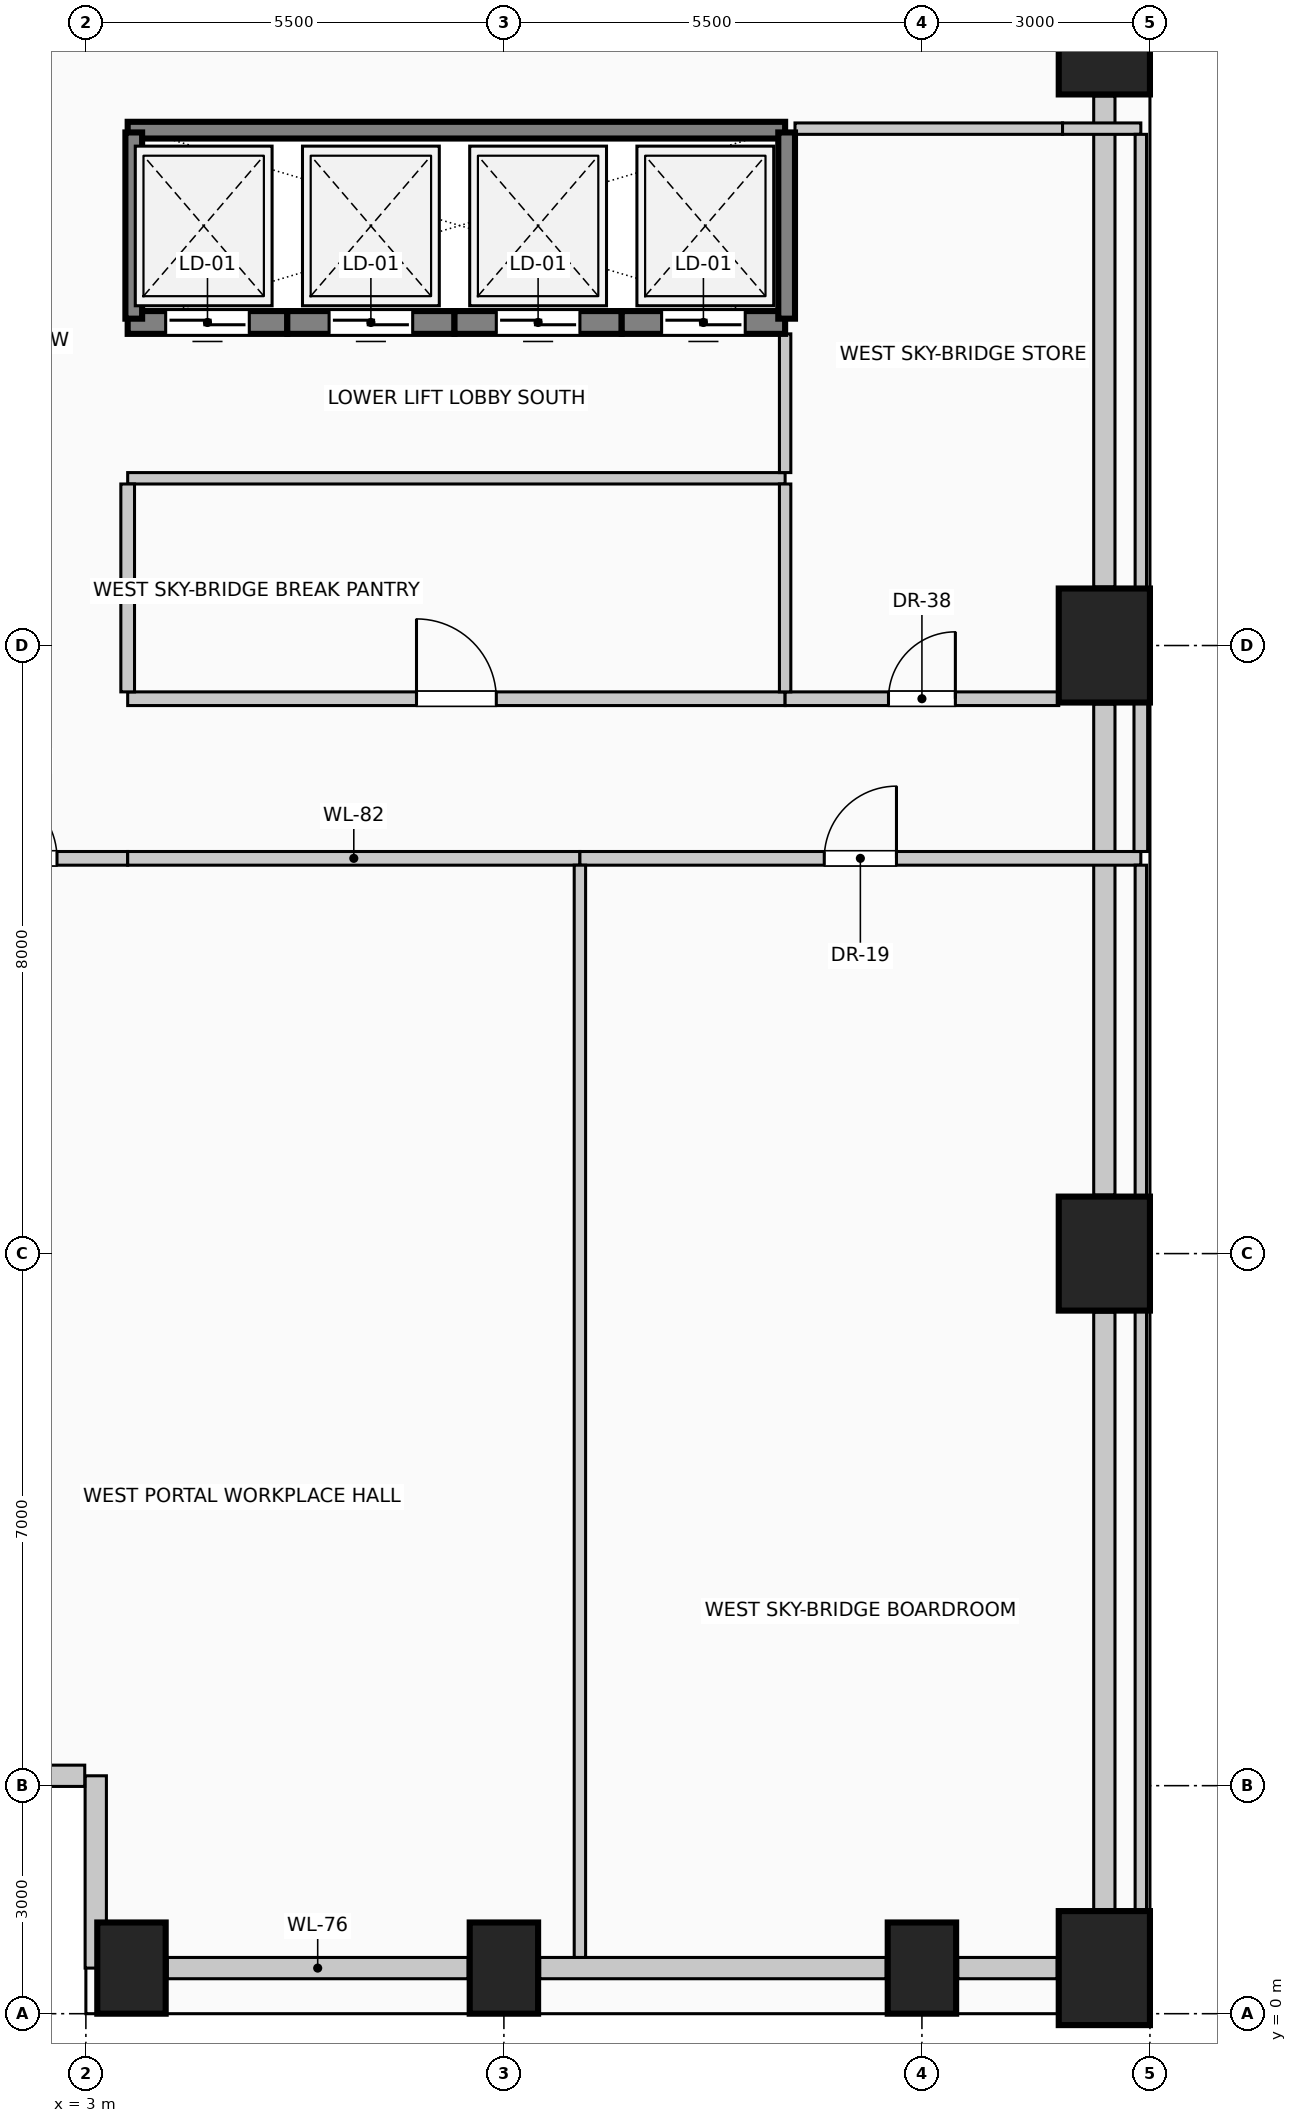
"""IFC4 building model, lengths in metres.
Left out: names, types, materials, properties, quantities, classifications, styles, units other than length and angle.
Written with IfcOpenShell. Run it as: python <this file> out.ifc"""

import sys

from ifc_helpers import new_model, si_unit, direction, frame, frame_2d, origin, origin_2d, place, context, subcontext, project, spatial, rectangle, extrude, element, fill, save


model = new_model("IFC4")
c1 = context("Model", 3, precision=1e-05, world=origin(), true_north=direction((0.0, 1.0)))
c2 = subcontext(c1, "Body", "Model", "MODEL_VIEW")
j1 = project(units=[si_unit("LENGTHUNIT", "METRE"), si_unit("PLANEANGLEUNIT", "RADIAN")], contexts=[c1])
p1 = place(None, origin())
s1 = spatial("IfcSite", under=j1, at=p1, CompositionType="ELEMENT")
p2 = place(p1, origin())
s2 = spatial("IfcBuilding", under=s1, at=p2, CompositionType="ELEMENT")
p3 = place(p2, frame((0.0, 0.0, 42.6)))
s3 = spatial("IfcBuildingStorey", under=s2, at=p3, CompositionType="ELEMENT", Elevation=42.6)
for number, where, z_axis, x_axis in (
    (1, (3.6, 0.6, 0.0), (0.0, 0.0, 1.0), (1.0, 0.0, 0.0)),
    (2, (8.5, 0.6, 0.0), (0.0, 0.0, 1.0), (1.0, 0.0, 0.0)),
    (3, (14.0, 0.6, 0.0), (0.0, 0.0, 1.0), (1.0, 0.0, 0.0)),
):
    element("IfcColumn", number, at=place(p3, frame(where, z_axis=z_axis, x_axis=x_axis)), inside=s3, PredefinedType="COLUMN", context=c2, shape_type="SweptSolid", body=[
        extrude(rectangle(XDim=0.9, YDim=1.2, at=origin_2d()), origin(), (0.0, 0.0, 1.0), 4.0),
    ])
for number, where, z_axis, x_axis in (
    (4, (16.4, 0.6, 0.0), (0.0, 0.0, 1.0), (1.0, 0.0, 0.0)),
    (5, (16.4, 10.0, 0.0), (0.0, 0.0, 1.0), (1.0, 0.0, 0.0)),
    (6, (16.4, 18.0, 0.0), (0.0, 0.0, 1.0), (1.0, 0.0, 0.0)),
    (7, (16.4, 26.0, 0.0), (0.0, 0.0, 1.0), (1.0, 0.0, 0.0)),
):
    element("IfcColumn", number, at=place(p3, frame(where, z_axis=z_axis, x_axis=x_axis)), inside=s3, PredefinedType="COLUMN", context=c2, shape_type="SweptSolid", body=[
        extrude(rectangle(XDim=1.2, YDim=1.5, at=origin_2d()), origin(), (0.0, 0.0, 1.0), 4.0),
    ])
p4 = place(p3, frame((8.03, 0.6, 0.0), z_axis=(0.0, 0.0, 1.0), x_axis=(-1.0, 0.0, 0.0)))
e8 = element("IfcWall", 8, at=p4, inside=s3, PredefinedType="SOLIDWALL", context=c2, shape_type="SweptSolid", body=[
    extrude(rectangle(XDim=3.96, YDim=0.28, at=frame_2d((1.98, 0.0))), origin(), (0.0, 0.0, 1.0), 2.85),
])
p5 = place(p3, frame((13.53, 0.6, 0.0), z_axis=(0.0, 0.0, 1.0), x_axis=(-1.0, 0.0, 0.0)))
e9 = element("IfcWall", 9, at=p5, inside=s3, PredefinedType="SOLIDWALL", context=c2, shape_type="SweptSolid", body=[
    extrude(rectangle(XDim=4.56, YDim=0.28, at=frame_2d((2.28, 0.0))), origin(), (0.0, 0.0, 1.0), 2.85),
])
p6 = place(p3, frame((15.78, 0.6, 0.0), z_axis=(0.0, 0.0, 1.0), x_axis=(-1.0, 0.0, 0.0)))
e10 = element("IfcWall", 10, at=p6, inside=s3, PredefinedType="SOLIDWALL", context=c2, shape_type="SweptSolid", body=[
    extrude(rectangle(XDim=1.31, YDim=0.28, at=frame_2d((0.655, 0.0))), origin(), (0.0, 0.0, 1.0), 2.85),
])
p7 = place(p3, frame((3.13, 0.6, 0.0), z_axis=(0.0, 0.0, 1.0), x_axis=(0.0, 1.0, 0.0)))
e11 = element("IfcWall", 11, at=p7, inside=s3, PredefinedType="SOLIDWALL", context=c2, shape_type="SweptSolid", body=[
    extrude(rectangle(XDim=2.53, YDim=0.28, at=frame_2d((1.265, 0.0))), origin(), (0.0, 0.0, 1.0), 3.7),
])
p8 = place(p3, frame((2.985, 3.13, 0.0), z_axis=(0.0, 0.0, 1.0), x_axis=(-1.0, 0.0, 0.0)))
e12 = element("IfcWall", 12, at=p8, inside=s3, PredefinedType="SOLIDWALL", context=c2, shape_type="SweptSolid", body=[
    extrude(rectangle(XDim=2.385, YDim=0.28, at=frame_2d((1.192, 0.0))), origin(), (0.0, 0.0, 1.0), 3.7),
])
p9 = place(p3, frame((16.4, 9.23, 0.0), z_axis=(0.0, 0.0, 1.0), x_axis=(0.0, -1.0, 0.0)))
e13 = element("IfcWall", 13, at=p9, inside=s3, PredefinedType="SOLIDWALL", context=c2, shape_type="SweptSolid", body=[
    extrude(rectangle(XDim=7.86, YDim=0.28, at=frame_2d((3.93, 0.0))), origin(), (0.0, 0.0, 1.0), 3.0),
])
for number, where, z_axis, x_axis in (
    (14, (16.4, 17.23, 0.0), (0.0, 0.0, 1.0), (0.0, -1.0, 0.0)),
    (15, (16.4, 25.23, 0.0), (0.0, 0.0, 1.0), (0.0, -1.0, 0.0)),
):
    element("IfcWall", number, at=place(p3, frame(where, z_axis=z_axis, x_axis=x_axis)), inside=s3, PredefinedType="SOLIDWALL", context=c2, shape_type="SweptSolid", body=[
        extrude(rectangle(XDim=6.46, YDim=0.28, at=frame_2d((3.23, 0.0))), origin(), (0.0, 0.0, 1.0), 3.0),
    ])
p10 = place(p3, frame((5.65, 22.25, 0.0), z_axis=(0.0, 0.0, 1.0), x_axis=(-1.0, 0.0, 0.0)))
e16 = element("IfcWall", 16, at=p10, inside=s3, PredefinedType="SOLIDWALL", context=c2, shape_type="SweptSolid", body=[
    extrude(rectangle(XDim=2.1, YDim=0.3, at=frame_2d((1.05, 0.0))), origin(), (0.0, 0.0, 1.0), 4.0),
])
p11 = place(p10, frame((0.5, 0.0, 0.0)))
e17 = element("IfcOpeningElement", 17, at=p11, cuts=e16, PredefinedType="OPENING", context=c2, shape_type="SweptSolid", body=[
    extrude(rectangle(XDim=1.1, YDim=2.2, at=frame_2d((0.55, 1.1))), frame((0.0, 0.16, 0.0), z_axis=(0.0, -1.0, 0.0), x_axis=(1.0, 0.0, 0.0)), (0.0, 0.0, 1.0), 0.32),
])
p12 = place(p3, frame((7.85, 22.25, 0.0), z_axis=(0.0, 0.0, 1.0), x_axis=(-1.0, 0.0, 0.0)))
e18 = element("IfcWall", 18, at=p12, inside=s3, PredefinedType="SOLIDWALL", context=c2, shape_type="SweptSolid", body=[
    extrude(rectangle(XDim=2.2, YDim=0.3, at=frame_2d((1.1, 0.0))), origin(), (0.0, 0.0, 1.0), 4.0),
])
p13 = place(p12, frame((0.55, 0.0, 0.0)))
e19 = element("IfcOpeningElement", 19, at=p13, cuts=e18, PredefinedType="OPENING", context=c2, shape_type="SweptSolid", body=[
    extrude(rectangle(XDim=1.1, YDim=2.2, at=frame_2d((0.55, 1.1))), frame((0.0, 0.16, 0.0), z_axis=(0.0, -1.0, 0.0), x_axis=(1.0, 0.0, 0.0)), (0.0, 0.0, 1.0), 0.32),
])
p14 = place(p3, frame((10.05, 22.25, 0.0), z_axis=(0.0, 0.0, 1.0), x_axis=(-1.0, 0.0, 0.0)))
e20 = element("IfcWall", 20, at=p14, inside=s3, PredefinedType="SOLIDWALL", context=c2, shape_type="SweptSolid", body=[
    extrude(rectangle(XDim=2.2, YDim=0.3, at=frame_2d((1.1, 0.0))), origin(), (0.0, 0.0, 1.0), 4.0),
])
p15 = place(p14, frame((0.55, 0.0, 0.0)))
e21 = element("IfcOpeningElement", 21, at=p15, cuts=e20, PredefinedType="OPENING", context=c2, shape_type="SweptSolid", body=[
    extrude(rectangle(XDim=1.1, YDim=2.2, at=frame_2d((0.55, 1.1))), frame((0.0, 0.16, 0.0), z_axis=(0.0, -1.0, 0.0), x_axis=(1.0, 0.0, 0.0)), (0.0, 0.0, 1.0), 0.32),
])
p16 = place(p3, frame((12.2, 22.25, 0.0), z_axis=(0.0, 0.0, 1.0), x_axis=(-1.0, 0.0, 0.0)))
e22 = element("IfcWall", 22, at=p16, inside=s3, PredefinedType="SOLIDWALL", context=c2, shape_type="SweptSolid", body=[
    extrude(rectangle(XDim=2.15, YDim=0.3, at=frame_2d((1.075, 0.0))), origin(), (0.0, 0.0, 1.0), 4.0),
])
p17 = place(p16, frame((0.525, 0.0, 0.0)))
e23 = element("IfcOpeningElement", 23, at=p17, cuts=e22, PredefinedType="OPENING", context=c2, shape_type="SweptSolid", body=[
    extrude(rectangle(XDim=1.1, YDim=2.2, at=frame_2d((0.55, 1.1))), frame((0.0, 0.16, 0.0), z_axis=(0.0, -1.0, 0.0), x_axis=(1.0, 0.0, 0.0)), (0.0, 0.0, 1.0), 0.32),
])
p18 = place(p3, frame((3.55, 24.78, 0.0), z_axis=(0.0, 0.0, 1.0), x_axis=(1.0, 0.0, 0.0)))
e24 = element("IfcWall", 24, at=p18, inside=s3, PredefinedType="SOLIDWALL", context=c2, shape_type="SweptSolid", body=[
    extrude(rectangle(XDim=8.65, YDim=0.22, at=frame_2d((4.325, 0.0))), origin(), (0.0, 0.0, 1.0), 4.0),
])
for number, where, z_axis, x_axis in (
    (25, (3.63, 22.3, 0.0), (0.0, 0.0, 1.0), (0.0, 1.0, 0.0)),
    (26, (12.22, 22.3, 0.0), (0.0, 0.0, 1.0), (0.0, 1.0, 0.0)),
):
    element("IfcWall", number, at=place(p3, frame(where, z_axis=z_axis, x_axis=x_axis)), inside=s3, PredefinedType="SOLIDWALL", context=c2, shape_type="SweptSolid", body=[
        extrude(rectangle(XDim=2.45, YDim=0.22, at=frame_2d((1.225, 0.0))), origin(), (0.0, 0.0, 1.0), 4.0),
    ])
p19 = place(p3, frame((0.74, 15.2, 0.0), z_axis=(0.0, 0.0, 1.0), x_axis=(1.0, 0.0, 0.0)))
e27 = element("IfcWall", 27, at=p19, inside=s3, PredefinedType="PARTITIONING", context=c2, shape_type="SweptSolid", body=[
    extrude(rectangle(XDim=2.81, YDim=0.18, at=frame_2d((1.405, 0.0))), origin(), (0.0, 0.0, 1.0), 3.7),
])
p20 = place(p19, frame((0.93, 0.0, 0.0)))
e28 = element("IfcOpeningElement", 28, at=p20, cuts=e27, PredefinedType="OPENING", context=c2, shape_type="SweptSolid", body=[
    extrude(rectangle(XDim=0.95, YDim=2.15, at=frame_2d((0.475, 1.075))), frame((0.0, 0.1, 0.0), z_axis=(0.0, -1.0, 0.0), x_axis=(1.0, 0.0, 0.0)), (0.0, 0.0, 1.0), 0.2),
])
p21 = place(p3, frame((3.55, 15.2, 0.0), z_axis=(0.0, 0.0, 1.0), x_axis=(1.0, 0.0, 0.0)))
e29 = element("IfcWall", 29, at=p21, inside=s3, PredefinedType="PARTITIONING", context=c2, shape_type="SweptSolid", body=[
    extrude(rectangle(XDim=5.95, YDim=0.18, at=frame_2d((2.975, 0.0))), origin(), (0.0, 0.0, 1.0), 3.7),
])
p22 = place(p3, frame((9.5, 15.2, 0.0), z_axis=(0.0, 0.0, 1.0), x_axis=(1.0, 0.0, 0.0)))
e30 = element("IfcWall", 30, at=p22, inside=s3, PredefinedType="PARTITIONING", context=c2, shape_type="SweptSolid", body=[
    extrude(rectangle(XDim=7.38, YDim=0.18, at=frame_2d((3.69, 0.0))), origin(), (0.0, 0.0, 1.0), 3.7),
])
p23 = place(p22, frame((3.215, 0.0, 0.0)))
e31 = element("IfcOpeningElement", 31, at=p23, cuts=e30, PredefinedType="OPENING", context=c2, shape_type="SweptSolid", body=[
    extrude(rectangle(XDim=0.95, YDim=2.15, at=frame_2d((0.475, 1.075))), frame((0.0, 0.1, 0.0), z_axis=(0.0, -1.0, 0.0), x_axis=(1.0, 0.0, 0.0)), (0.0, 0.0, 1.0), 0.2),
])
p24 = place(p3, frame((3.55, 17.3, 0.0), z_axis=(0.0, 0.0, 1.0), x_axis=(1.0, 0.0, 0.0)))
e32 = element("IfcWall", 32, at=p24, inside=s3, PredefinedType="PARTITIONING", context=c2, shape_type="SweptSolid", body=[
    extrude(rectangle(XDim=8.65, YDim=0.18, at=frame_2d((4.325, 0.0))), origin(), (0.0, 0.0, 1.0), 3.7),
])
p25 = place(p24, frame((3.8, 0.0, 0.0)))
e33 = element("IfcOpeningElement", 33, at=p25, cuts=e32, PredefinedType="OPENING", context=c2, shape_type="SweptSolid", body=[
    extrude(rectangle(XDim=1.05, YDim=2.15, at=frame_2d((0.525, 1.075))), frame((0.0, 0.1, 0.0), z_axis=(0.0, -1.0, 0.0), x_axis=(1.0, 0.0, 0.0)), (0.0, 0.0, 1.0), 0.2),
])
p26 = place(p3, frame((12.2, 17.3, 0.0), z_axis=(0.0, 0.0, 1.0), x_axis=(1.0, 0.0, 0.0)))
e34 = element("IfcWall", 34, at=p26, inside=s3, PredefinedType="PARTITIONING", context=c2, shape_type="SweptSolid", body=[
    extrude(rectangle(XDim=3.6, YDim=0.18, at=frame_2d((1.8, 0.0))), origin(), (0.0, 0.0, 1.0), 3.7),
])
p27 = place(p26, frame((1.36, 0.0, 0.0)))
e35 = element("IfcOpeningElement", 35, at=p27, cuts=e34, PredefinedType="OPENING", context=c2, shape_type="SweptSolid", body=[
    extrude(rectangle(XDim=0.88, YDim=2.1, at=frame_2d((0.44, 1.05))), frame((0.0, 0.1, 0.0), z_axis=(0.0, -1.0, 0.0), x_axis=(1.0, 0.0, 0.0)), (0.0, 0.0, 1.0), 0.2),
])
p28 = place(p3, frame((3.55, 20.2, 0.0), z_axis=(0.0, 0.0, 1.0), x_axis=(1.0, 0.0, 0.0)))
e36 = element("IfcWall", 36, at=p28, inside=s3, PredefinedType="PARTITIONING", context=c2, shape_type="SweptSolid", body=[
    extrude(rectangle(XDim=8.65, YDim=0.15, at=frame_2d((4.325, 0.0))), origin(), (0.0, 0.0, 1.0), 3.7),
])
p29 = place(p3, frame((12.33, 24.8, 0.0), z_axis=(0.0, 0.0, 1.0), x_axis=(1.0, 0.0, 0.0)))
e37 = element("IfcWall", 37, at=p29, inside=s3, PredefinedType="PARTITIONING", context=c2, shape_type="SweptSolid", body=[
    extrude(rectangle(XDim=3.52, YDim=0.15, at=frame_2d((1.76, 0.0))), origin(), (0.0, 0.0, 1.0), 3.7),
])
p30 = place(p3, frame((15.85, 24.8, 0.0), z_axis=(0.0, 0.0, 1.0), x_axis=(1.0, 0.0, 0.0)))
e38 = element("IfcWall", 38, at=p30, inside=s3, PredefinedType="PARTITIONING", context=c2, shape_type="SweptSolid", body=[
    extrude(rectangle(XDim=1.03, YDim=0.15, at=frame_2d((0.515, 0.0))), origin(), (0.0, 0.0, 1.0), 3.7),
])
p31 = place(p3, frame((3.55, 17.39, 0.0), z_axis=(0.0, 0.0, 1.0), x_axis=(0.0, 1.0, 0.0)))
e39 = element("IfcWall", 39, at=p31, inside=s3, PredefinedType="PARTITIONING", context=c2, shape_type="SweptSolid", body=[
    extrude(rectangle(XDim=2.735, YDim=0.18, at=frame_2d((1.368, 0.0))), origin(), (0.0, 0.0, 1.0), 3.7),
])
p32 = place(p3, frame((9.5, 0.74, 0.0), z_axis=(0.0, 0.0, 1.0), x_axis=(0.0, 1.0, 0.0)))
e40 = element("IfcWall", 40, at=p32, inside=s3, PredefinedType="PARTITIONING", context=c2, shape_type="SweptSolid", body=[
    extrude(rectangle(XDim=14.37, YDim=0.15, at=frame_2d((7.185, 0.0))), origin(), (0.0, 0.0, 1.0), 3.7),
])
p33 = place(p3, frame((12.2, 17.39, 0.0), z_axis=(0.0, 0.0, 1.0), x_axis=(0.0, 1.0, 0.0)))
e41 = element("IfcWall", 41, at=p33, inside=s3, PredefinedType="PARTITIONING", context=c2, shape_type="SweptSolid", body=[
    extrude(rectangle(XDim=2.735, YDim=0.15, at=frame_2d((1.368, 0.0))), origin(), (0.0, 0.0, 1.0), 3.7),
])
p34 = place(p3, frame((12.2, 20.275, 0.0), z_axis=(0.0, 0.0, 1.0), x_axis=(0.0, 1.0, 0.0)))
e42 = element("IfcWall", 42, at=p34, inside=s3, PredefinedType="PARTITIONING", context=c2, shape_type="SweptSolid", body=[
    extrude(rectangle(XDim=1.825, YDim=0.15, at=frame_2d((0.913, 0.0))), origin(), (0.0, 0.0, 1.0), 3.7),
])
p35 = place(p3, frame((16.88, 1.35, 0.0), z_axis=(0.0, 0.0, 1.0), x_axis=(0.0, 1.0, 0.0)))
e43 = element("IfcWall", 43, at=p35, inside=s3, PredefinedType="PARTITIONING", context=c2, shape_type="SweptSolid", body=[
    extrude(rectangle(XDim=7.9, YDim=0.15, at=frame_2d((3.95, 0.0))), origin(), (0.0, 0.0, 1.0), 3.7),
])
p36 = place(p3, frame((16.88, 10.75, 0.0), z_axis=(0.0, 0.0, 1.0), x_axis=(0.0, 1.0, 0.0)))
e44 = element("IfcWall", 44, at=p36, inside=s3, PredefinedType="PARTITIONING", context=c2, shape_type="SweptSolid", body=[
    extrude(rectangle(XDim=4.36, YDim=0.15, at=frame_2d((2.18, 0.0))), origin(), (0.0, 0.0, 1.0), 3.7),
])
p37 = place(p3, frame((16.88, 15.29, 0.0), z_axis=(0.0, 0.0, 1.0), x_axis=(0.0, 1.0, 0.0)))
e45 = element("IfcWall", 45, at=p37, inside=s3, PredefinedType="PARTITIONING", context=c2, shape_type="SweptSolid", body=[
    extrude(rectangle(XDim=1.96, YDim=0.18, at=frame_2d((0.98, 0.0))), origin(), (0.0, 0.0, 1.0), 3.7),
])
p38 = place(p3, frame((16.88, 18.75, 0.0), z_axis=(0.0, 0.0, 1.0), x_axis=(0.0, 1.0, 0.0)))
e46 = element("IfcWall", 46, at=p38, inside=s3, PredefinedType="PARTITIONING", context=c2, shape_type="SweptSolid", body=[
    extrude(rectangle(XDim=5.975, YDim=0.15, at=frame_2d((2.988, 0.0))), origin(), (0.0, 0.0, 1.0), 3.7),
])
p39 = place(p11, origin())
e47 = element("IfcDoor", 47, at=p39, inside=s3, OperationType="SLIDING_TO_LEFT", PredefinedType="DOOR", context=c2, shape_type="SweptSolid", body=[
    extrude(rectangle(XDim=1.1, YDim=2.2, at=frame_2d((0.55, 1.1))), frame((0.0, 0.025, 0.0), z_axis=(0.0, -1.0, 0.0), x_axis=(1.0, 0.0, 0.0)), (0.0, 0.0, 1.0), 0.05),
])
fill(e17, e47)
p40 = place(p13, origin())
e48 = element("IfcDoor", 48, at=p40, inside=s3, OperationType="SLIDING_TO_RIGHT", PredefinedType="DOOR", context=c2, shape_type="SweptSolid", body=[
    extrude(rectangle(XDim=1.1, YDim=2.2, at=frame_2d((0.55, 1.1))), frame((0.0, 0.025, 0.0), z_axis=(0.0, -1.0, 0.0), x_axis=(1.0, 0.0, 0.0)), (0.0, 0.0, 1.0), 0.05),
])
fill(e19, e48)
p41 = place(p15, origin())
e49 = element("IfcDoor", 49, at=p41, inside=s3, OperationType="SLIDING_TO_LEFT", PredefinedType="DOOR", context=c2, shape_type="SweptSolid", body=[
    extrude(rectangle(XDim=1.1, YDim=2.2, at=frame_2d((0.55, 1.1))), frame((0.0, 0.025, 0.0), z_axis=(0.0, -1.0, 0.0), x_axis=(1.0, 0.0, 0.0)), (0.0, 0.0, 1.0), 0.05),
])
fill(e21, e49)
p42 = place(p17, origin())
e50 = element("IfcDoor", 50, at=p42, inside=s3, OperationType="SLIDING_TO_RIGHT", PredefinedType="DOOR", context=c2, shape_type="SweptSolid", body=[
    extrude(rectangle(XDim=1.1, YDim=2.2, at=frame_2d((0.55, 1.1))), frame((0.0, 0.025, 0.0), z_axis=(0.0, -1.0, 0.0), x_axis=(1.0, 0.0, 0.0)), (0.0, 0.0, 1.0), 0.05),
])
fill(e23, e50)
p43 = place(p20, origin())
e51 = element("IfcDoor", 51, at=p43, inside=s3, OperationType="SINGLE_SWING_LEFT", PredefinedType="DOOR", context=c2, shape_type="SweptSolid", body=[
    extrude(rectangle(XDim=0.95, YDim=2.15, at=frame_2d((0.475, 1.075))), frame((0.0, 0.025, 0.0), z_axis=(0.0, -1.0, 0.0), x_axis=(1.0, 0.0, 0.0)), (0.0, 0.0, 1.0), 0.05),
])
fill(e28, e51)
p44 = place(p23, origin())
e52 = element("IfcDoor", 52, at=p44, inside=s3, OperationType="SINGLE_SWING_RIGHT", PredefinedType="DOOR", context=c2, shape_type="SweptSolid", body=[
    extrude(rectangle(XDim=0.95, YDim=2.15, at=frame_2d((0.475, 1.075))), frame((0.0, 0.025, 0.0), z_axis=(0.0, -1.0, 0.0), x_axis=(1.0, 0.0, 0.0)), (0.0, 0.0, 1.0), 0.05),
])
fill(e31, e52)
p45 = place(p25, origin())
e53 = element("IfcDoor", 53, at=p45, inside=s3, OperationType="SINGLE_SWING_LEFT", PredefinedType="DOOR", context=c2, shape_type="SweptSolid", body=[
    extrude(rectangle(XDim=1.05, YDim=2.15, at=frame_2d((0.525, 1.075))), frame((0.0, 0.025, 0.0), z_axis=(0.0, -1.0, 0.0), x_axis=(1.0, 0.0, 0.0)), (0.0, 0.0, 1.0), 0.05),
])
fill(e33, e53)
p46 = place(p27, origin())
e54 = element("IfcDoor", 54, at=p46, inside=s3, OperationType="SINGLE_SWING_RIGHT", PredefinedType="DOOR", context=c2, shape_type="SweptSolid", body=[
    extrude(rectangle(XDim=0.88, YDim=2.1, at=frame_2d((0.44, 1.05))), frame((0.0, 0.025, 0.0), z_axis=(0.0, -1.0, 0.0), x_axis=(1.0, 0.0, 0.0)), (0.0, 0.0, 1.0), 0.05),
])
fill(e35, e54)
save(model, sys.argv[1])
